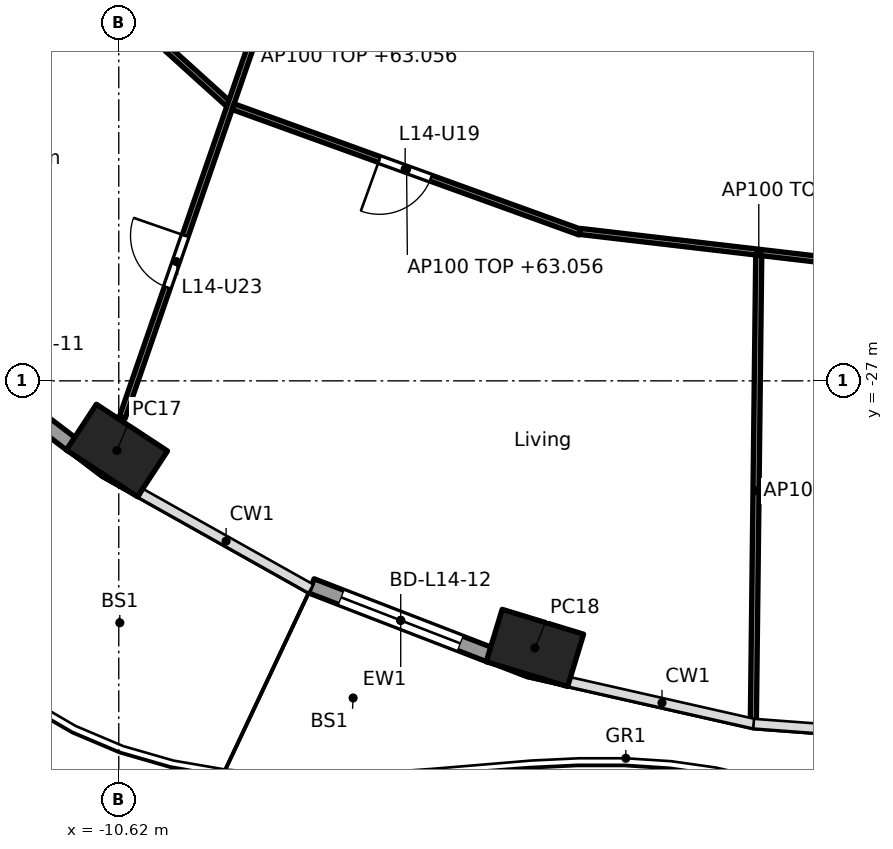
"""IFC4 building model, lengths in metres.
Left out: names, types, materials, properties, quantities, classifications, styles, units other than length and angle.
Written with IfcOpenShell. Run it as: python <this file> out.ifc"""

import sys

from ifc_helpers import new_model, si_unit, direction, frame, frame_2d, origin, origin_2d, place, context, subcontext, project, spatial, rectangle, hollow_rectangle, extrude, element, fill, save


model = new_model("IFC4")
c1 = context("Model", 3, precision=1e-05, world=origin(), true_north=direction((0.0, 1.0)))
c2 = subcontext(c1, "Body", "Model", "MODEL_VIEW")
j1 = project(units=[si_unit("LENGTHUNIT", "METRE"), si_unit("PLANEANGLEUNIT", "RADIAN")], contexts=[c1])
p1 = place(None, origin())
s1 = spatial("IfcSite", under=j1, at=p1, CompositionType="ELEMENT")
p2 = place(p1, origin())
s2 = spatial("IfcBuilding", under=s1, at=p2, CompositionType="ELEMENT")
p3 = place(p2, frame((0.0, 0.0, 60.3)))
s3 = spatial("IfcBuildingStorey", under=s2, at=p3, CompositionType="ELEMENT", Elevation=60.3)
for number, where, z_axis, x_axis in (
    (1, (-10.65, -28.146, 0.0), (0.0, 0.0, 1.0), (0.836, -0.549, 0.0)),
    (2, (-3.776, -31.393, 0.0), (0.0, 0.0, 1.0), (0.957, -0.292, 0.0)),
):
    element("IfcColumn", number, at=place(p3, frame(where, z_axis=z_axis, x_axis=x_axis)), inside=s3, PredefinedType="COLUMN", context=c2, shape_type="SweptSolid", body=[
        extrude(hollow_rectangle(XDim=1.4, YDim=0.9, WallThickness=0.05, at=origin_2d()), origin(), (0.0, 0.0, 1.0), 3.7),
    ])
p4 = place(p3, frame((-11.382, -28.056, 0.0), z_axis=(0.0, 0.0, 1.0), x_axis=(-0.796022293214, 0.605267303517, 0.0)))
e3 = element("IfcWall", 3, at=p4, inside=s3, PredefinedType="SOLIDWALL", context=c2, shape_type="SweptSolid", body=[
    extrude(rectangle(XDim=3.262, YDim=0.25, at=frame_2d((1.631, 0.0))), origin(), (0.0, 0.0, 1.0), 3.44),
])
p5 = place(p4, frame((0.581, 0.0, 0.0)))
e4 = element("IfcOpeningElement", 4, at=p5, cuts=e3, PredefinedType="OPENING", context=c2, shape_type="SweptSolid", body=[
    extrude(rectangle(XDim=2.1, YDim=2.4, at=frame_2d((1.05, 1.2))), frame((0.0, 0.135, 0.0), z_axis=(0.0, -1.0, 0.0), x_axis=(1.0, 0.0, 0.0)), (0.0, 0.0, 1.0), 0.27),
])
p6 = place(p3, frame((-4.514, -31.507, 0.0), z_axis=(0.0, 0.0, 1.0), x_axis=(-0.932809381943, 0.360370166577, 0.0)))
e5 = element("IfcWall", 5, at=p6, inside=s3, PredefinedType="SOLIDWALL", context=c2, shape_type="SweptSolid", body=[
    extrude(rectangle(XDim=3.151, YDim=0.25, at=frame_2d((1.575, 0.0))), origin(), (0.0, 0.0, 1.0), 3.44),
])
p7 = place(p6, frame((0.525, 0.0, 0.0)))
e6 = element("IfcOpeningElement", 6, at=p7, cuts=e5, PredefinedType="OPENING", context=c2, shape_type="SweptSolid", body=[
    extrude(rectangle(XDim=2.1, YDim=2.4, at=frame_2d((1.05, 1.2))), frame((0.0, 0.135, 0.0), z_axis=(0.0, -1.0, 0.0), x_axis=(1.0, 0.0, 0.0)), (0.0, 0.0, 1.0), 0.27),
])
p8 = place(p3, frame((-13.355, -18.343, 0.0), z_axis=(0.0, 0.0, 1.0), x_axis=(0.741722263338, -0.670707152242, 0.0)))
e7 = element("IfcWall", 7, at=p8, inside=s3, PredefinedType="PARTITIONING", context=c2, shape_type="SweptSolid", body=[
    extrude(rectangle(XDim=6.109, YDim=0.1, at=frame_2d((3.055, 0.0))), origin(), (0.0, 0.0, 1.0), 2.756),
])
p9 = place(p3, frame((-6.139, -14.829, 0.0), z_axis=(0.0, 0.0, 1.0), x_axis=(-0.327178799566, -0.944962450637, 0.0)))
e8 = element("IfcWall", 8, at=p9, inside=s3, PredefinedType="PARTITIONING", context=c2, shape_type="SweptSolid", body=[
    extrude(rectangle(XDim=13.517, YDim=0.1, at=frame_2d((6.759, 0.0))), origin(), (0.0, 0.0, 1.0), 2.756),
])
p10 = place(p9, frame((4.665, 0.0, 0.0)))
e9 = element("IfcOpeningElement", 9, at=p10, cuts=e8, PredefinedType="OPENING", context=c2, shape_type="SweptSolid", body=[
    extrude(rectangle(XDim=0.9, YDim=2.1, at=frame_2d((0.45, 1.05))), frame((0.0, 0.06, 0.0), z_axis=(0.0, -1.0, 0.0), x_axis=(1.0, 0.0, 0.0)), (0.0, 0.0, 1.0), 0.12),
])
p11 = place(p9, frame((10.354, 0.0, 0.0)))
e10 = element("IfcOpeningElement", 10, at=p11, cuts=e8, PredefinedType="OPENING", context=c2, shape_type="SweptSolid", body=[
    extrude(rectangle(XDim=0.9, YDim=2.1, at=frame_2d((0.45, 1.05))), frame((0.0, 0.06, 0.0), z_axis=(0.0, -1.0, 0.0), x_axis=(1.0, 0.0, 0.0)), (0.0, 0.0, 1.0), 0.12),
])
p12 = place(p3, frame((-8.739, -22.491, 0.0), z_axis=(0.0, 0.0, 1.0), x_axis=(0.940401691072, -0.340065669288, 0.0)))
e11 = element("IfcWall", 11, at=p12, inside=s3, PredefinedType="PARTITIONING", context=c2, shape_type="SweptSolid", body=[
    extrude(rectangle(XDim=6.067, YDim=0.1, at=frame_2d((3.034, 0.0))), origin(), (0.0, 0.0, 1.0), 2.756),
])
p13 = place(p12, frame((2.559, 0.0, 0.0)))
e12 = element("IfcOpeningElement", 12, at=p13, cuts=e11, PredefinedType="OPENING", context=c2, shape_type="SweptSolid", body=[
    extrude(rectangle(XDim=0.9, YDim=2.1, at=frame_2d((0.45, 1.05))), frame((0.0, 0.06, 0.0), z_axis=(0.0, -1.0, 0.0), x_axis=(1.0, 0.0, 0.0)), (0.0, 0.0, 1.0), 0.12),
])
p14 = place(p3, frame((-3.031, -24.543, 0.0), z_axis=(0.0, 0.0, 1.0), x_axis=(0.993255612046, -0.115945198862, 0.0)))
e13 = element("IfcWall", 13, at=p14, inside=s3, PredefinedType="PARTITIONING", context=c2, shape_type="SweptSolid", body=[
    extrude(rectangle(XDim=5.913, YDim=0.1, at=frame_2d((2.956, 0.0))), origin(), (0.0, 0.0, 1.0), 2.756),
])
p15 = place(p3, frame((-0.095, -24.936, 0.0), z_axis=(0.0, 0.0, 1.0), x_axis=(-0.011541331541, -0.999933396615, 0.0)))
e14 = element("IfcWall", 14, at=p15, inside=s3, PredefinedType="PARTITIONING", context=c2, shape_type="SweptSolid", body=[
    extrude(rectangle(XDim=7.742, YDim=0.1, at=frame_2d((3.871, 0.0))), origin(), (0.0, 0.0, 1.0), 2.837),
])
p16 = place(p7, origin())
e15 = element("IfcDoor", 15, at=p16, inside=s3, OperationType="SLIDING_TO_LEFT", PredefinedType="DOOR", context=c2, shape_type="SweptSolid", body=[
    extrude(rectangle(XDim=2.1, YDim=2.4, at=frame_2d((1.05, 1.2))), frame((0.0, 0.025, 0.0), z_axis=(0.0, -1.0, 0.0), x_axis=(1.0, 0.0, 0.0)), (0.0, 0.0, 1.0), 0.05),
])
fill(e6, e15)
p17 = place(p13, frame((0.9, 0.0, 0.0), x_axis=(-1.0, 0.0, 0.0)))
e16 = element("IfcDoor", 16, at=p17, inside=s3, OperationType="SINGLE_SWING_RIGHT", PredefinedType="DOOR", context=c2, shape_type="SweptSolid", body=[
    extrude(rectangle(XDim=0.9, YDim=2.1, at=frame_2d((0.45, 1.05))), frame((0.0, 0.025, 0.0), z_axis=(0.0, -1.0, 0.0), x_axis=(1.0, 0.0, 0.0)), (0.0, 0.0, 1.0), 0.05),
])
fill(e12, e16)
p18 = place(p11, frame((0.9, 0.0, 0.0), x_axis=(-1.0, 0.0, 0.0)))
e17 = element("IfcDoor", 17, at=p18, inside=s3, OperationType="SINGLE_SWING_RIGHT", PredefinedType="DOOR", context=c2, shape_type="SweptSolid", body=[
    extrude(rectangle(XDim=0.9, YDim=2.1, at=frame_2d((0.45, 1.05))), frame((0.0, 0.025, 0.0), z_axis=(0.0, -1.0, 0.0), x_axis=(1.0, 0.0, 0.0)), (0.0, 0.0, 1.0), 0.05),
])
fill(e10, e17)
save(model, sys.argv[1])
